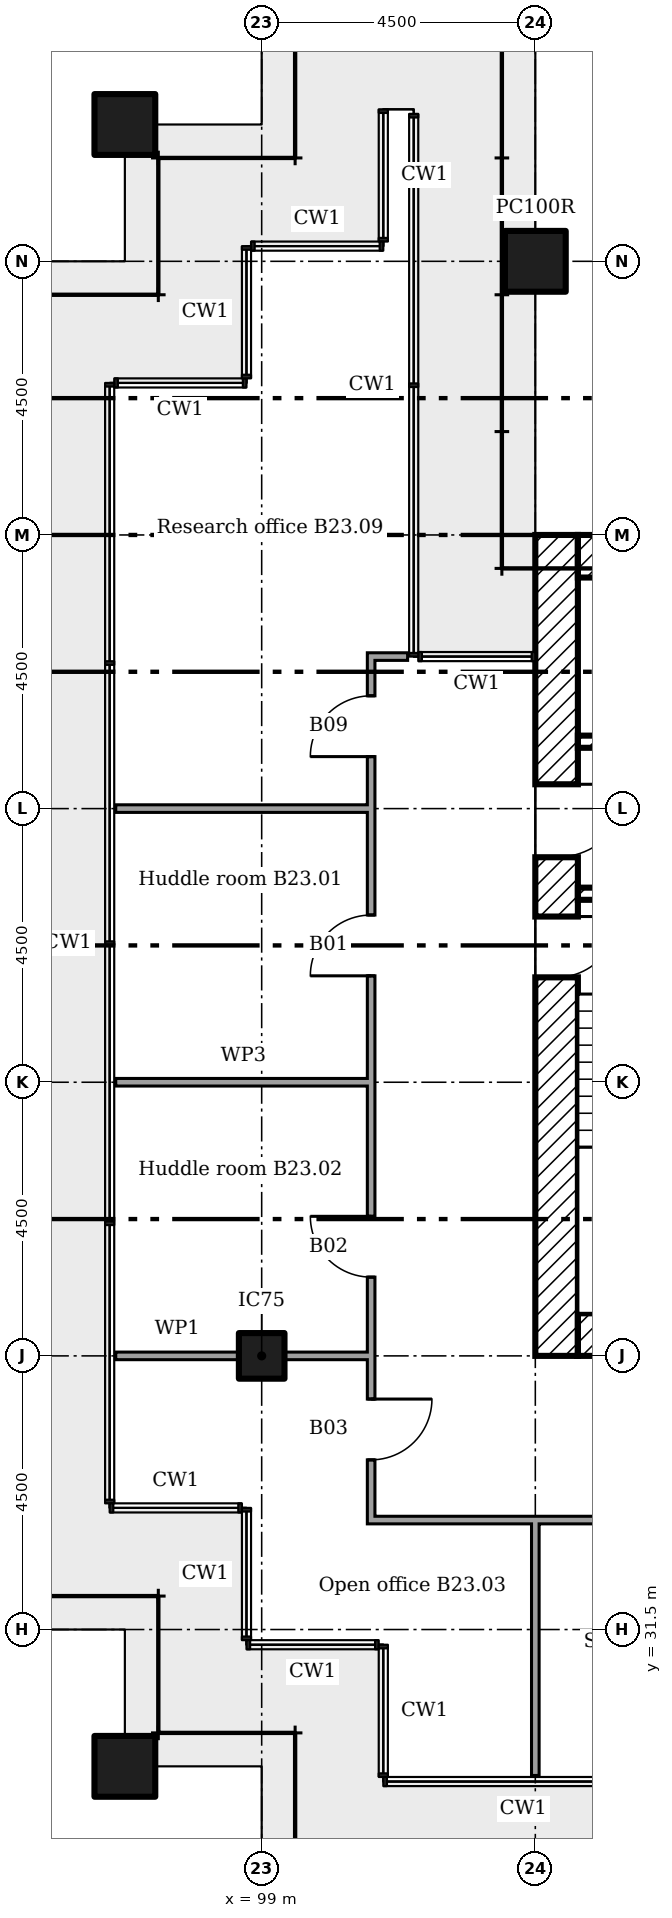
"""IFC4 building model, lengths in metres.
Left out: names, types, materials, properties, quantities, classifications, styles, units other than length and angle.
Written with IfcOpenShell. Run it as: python <this file> out.ifc"""

import sys

from ifc_helpers import new_model, si_unit, direction, frame, frame_2d, origin, origin_2d, place, context, subcontext, project, spatial, rectangle, extrude, element, fill, save


model = new_model("IFC4")
c1 = context("Model", 3, precision=1e-05, world=origin(), true_north=direction((0.0, 1.0)))
c2 = subcontext(c1, "Body", "Model", "MODEL_VIEW")
j1 = project(units=[si_unit("LENGTHUNIT", "METRE"), si_unit("PLANEANGLEUNIT", "RADIAN")], contexts=[c1])
p1 = place(None, origin())
s1 = spatial("IfcSite", under=j1, at=p1, CompositionType="ELEMENT")
p2 = place(p1, origin())
s2 = spatial("IfcBuilding", under=s1, at=p2, CompositionType="ELEMENT")
p3 = place(p2, frame((0.0, 0.0, 95.6)))
s3 = spatial("IfcBuildingStorey", under=s2, at=p3, CompositionType="ELEMENT", Elevation=95.6)
for number, where in (
    (1, (103.5, 54.0, 0.0)),
    (2, (96.75, 56.25, 0.0)),
    (3, (96.75, 29.25, 0.0)),
):
    element("IfcColumn", number, at=place(p3, frame(where)), inside=s3, PredefinedType="COLUMN", context=c2, shape_type="SweptSolid", body=[
        extrude(rectangle(XDim=1.0, YDim=1.0, at=origin_2d()), origin(), (0.0, 0.0, 1.0), 3.6),
    ])
p4 = place(p3, frame((99.0, 36.0, 0.0)))
e4 = element("IfcColumn", 4, at=p4, inside=s3, PredefinedType="COLUMN", context=c2, shape_type="SweptSolid", body=[
    extrude(rectangle(XDim=0.75, YDim=0.75, at=origin_2d()), origin(), (0.0, 0.0, 1.0), 3.6),
])
for number, where in (
    (5, (104.2, 49.15, 0.0)),
    (6, (104.2, 36.35, 0.0)),
):
    element("IfcWall", number, at=place(p3, frame(where)), inside=s3, PredefinedType="SHEAR", context=c2, shape_type="SweptSolid", body=[
        extrude(rectangle(XDim=12.1, YDim=0.7, at=frame_2d((6.05, 0.0))), origin(), (0.0, 0.0, 1.0), 3.35),
    ])
p5 = place(p3, frame((103.85, 36.0, 0.0), z_axis=(0.0, 0.0, 1.0), x_axis=(0.0, 1.0, 0.0)))
e7 = element("IfcWall", 7, at=p5, inside=s3, PredefinedType="SHEAR", context=c2, shape_type="SweptSolid", body=[
    extrude(rectangle(XDim=13.5, YDim=0.7, at=frame_2d((6.75, 0.0))), origin(), (0.0, 0.0, 1.0), 3.35),
])
p6 = place(p5, frame((8.2, 0.0, 0.0)))
e8 = element("IfcOpeningElement", 8, at=p6, cuts=e7, PredefinedType="OPENING", context=c2, shape_type="SweptSolid", body=[
    extrude(rectangle(XDim=1.2, YDim=2.1, at=frame_2d((0.6, 1.05))), frame((0.0, 0.36, 0.0), z_axis=(0.0, -1.0, 0.0), x_axis=(1.0, 0.0, 0.0)), (0.0, 0.0, 1.0), 0.72),
])
p7 = place(p5, frame((6.225, 0.0, 0.0)))
e9 = element("IfcOpeningElement", 9, at=p7, cuts=e7, PredefinedType="OPENING", context=c2, shape_type="SweptSolid", body=[
    extrude(rectangle(XDim=1.0, YDim=2.1, at=frame_2d((0.5, 1.05))), frame((0.0, 0.36, 0.0), z_axis=(0.0, -1.0, 0.0), x_axis=(1.0, 0.0, 0.0)), (0.0, 0.0, 1.0), 0.72),
])
p8 = place(p3, frame((104.2, 46.1, 0.0)))
e10 = element("IfcWall", 10, at=p8, inside=s3, PredefinedType="SHEAR", context=c2, shape_type="SweptSolid", body=[
    extrude(rectangle(XDim=3.133, YDim=0.2, at=frame_2d((1.567, 0.0))), origin(), (0.0, 0.0, 1.0), 3.35),
])
p9 = place(p8, frame((1.317, 0.0, 0.0)))
e11 = element("IfcOpeningElement", 11, at=p9, cuts=e10, PredefinedType="OPENING", context=c2, shape_type="SweptSolid", body=[
    extrude(rectangle(XDim=0.9, YDim=2.1, at=frame_2d((0.45, 1.05))), frame((0.0, 0.11, 0.0), z_axis=(0.0, -1.0, 0.0), x_axis=(1.0, 0.0, 0.0)), (0.0, 0.0, 1.0), 0.22),
])
p10 = place(p3, frame((104.2, 43.6, 0.0)))
e12 = element("IfcWall", 12, at=p10, inside=s3, PredefinedType="SHEAR", context=c2, shape_type="SweptSolid", body=[
    extrude(rectangle(XDim=2.8, YDim=0.2, at=frame_2d((1.4, 0.0))), origin(), (0.0, 0.0, 1.0), 3.35),
])
p11 = place(p10, frame((1.05, 0.0, 0.0)))
e13 = element("IfcOpeningElement", 13, at=p11, cuts=e12, PredefinedType="OPENING", context=c2, shape_type="SweptSolid", body=[
    extrude(rectangle(XDim=1.0, YDim=2.1, at=frame_2d((0.5, 1.05))), frame((0.0, 0.11, 0.0), z_axis=(0.0, -1.0, 0.0), x_axis=(1.0, 0.0, 0.0)), (0.0, 0.0, 1.0), 0.22),
])
p12 = place(p3, frame((100.738, 33.3, 0.0)))
e14 = element("IfcWall", 14, at=p12, inside=s3, PredefinedType="PARTITIONING", context=c2, shape_type="SweptSolid", body=[
    extrude(rectangle(XDim=19.025, YDim=0.125, at=frame_2d((9.512, 0.0))), origin(), (0.0, 0.0, 1.0), 3.45),
])
p13 = place(p12, frame((6.762, 0.0, 0.0)))
e15 = element("IfcOpeningElement", 15, at=p13, cuts=e14, PredefinedType="OPENING", context=c2, shape_type="SweptSolid", body=[
    extrude(rectangle(XDim=1.0, YDim=2.1, at=frame_2d((0.5, 1.05))), frame((0.0, 0.073, 0.0), z_axis=(0.0, -1.0, 0.0), x_axis=(1.0, 0.0, 0.0)), (0.0, 0.0, 1.0), 0.145),
])
p14 = place(p12, frame((13.058, 0.0, 0.0)))
e16 = element("IfcOpeningElement", 16, at=p14, cuts=e14, PredefinedType="OPENING", context=c2, shape_type="SweptSolid", body=[
    extrude(rectangle(XDim=1.0, YDim=2.1, at=frame_2d((0.5, 1.05))), frame((0.0, 0.073, 0.0), z_axis=(0.0, -1.0, 0.0), x_axis=(1.0, 0.0, 0.0)), (0.0, 0.0, 1.0), 0.145),
])
p15 = place(p3, frame((96.6, 36.0, 0.0)))
e17 = element("IfcWall", 17, at=p15, inside=s3, PredefinedType="PARTITIONING", context=c2, shape_type="SweptSolid", body=[
    extrude(rectangle(XDim=2.025, YDim=0.125, at=frame_2d((1.012, 0.0))), origin(), (0.0, 0.0, 1.0), 2.842),
])
p16 = place(p3, frame((99.375, 36.0, 0.0)))
e18 = element("IfcWall", 18, at=p16, inside=s3, PredefinedType="PARTITIONING", context=c2, shape_type="SweptSolid", body=[
    extrude(rectangle(XDim=1.425, YDim=0.125, at=frame_2d((0.712, 0.0))), origin(), (0.0, 0.0, 1.0), 2.842),
])
p17 = place(p3, frame((96.6, 40.5, 0.0)))
e19 = element("IfcWall", 19, at=p17, inside=s3, PredefinedType="MOVABLE", context=c2, shape_type="SweptSolid", body=[
    extrude(rectangle(XDim=4.2, YDim=0.125, at=frame_2d((2.1, 0.0))), origin(), (0.0, 0.0, 1.0), 2.851),
])
p18 = place(p3, frame((96.6, 45.0, 0.0)))
e20 = element("IfcWall", 20, at=p18, inside=s3, PredefinedType="PARTITIONING", context=c2, shape_type="SweptSolid", body=[
    extrude(rectangle(XDim=4.2, YDim=0.125, at=frame_2d((2.1, 0.0))), origin(), (0.0, 0.0, 1.0), 2.851),
])
p19 = place(p3, frame((100.738, 47.5, 0.0)))
e21 = element("IfcWall", 21, at=p19, inside=s3, PredefinedType="PARTITIONING", context=c2, shape_type="SweptSolid", body=[
    extrude(rectangle(XDim=0.662, YDim=0.125, at=frame_2d((0.331, 0.0))), origin(), (0.0, 0.0, 1.0), 3.45),
])
p20 = place(p3, frame((100.8, 33.363, 0.0), z_axis=(0.0, 0.0, 1.0), x_axis=(0.0, 1.0, 0.0)))
e22 = element("IfcWall", 22, at=p20, inside=s3, PredefinedType="PARTITIONING", context=c2, shape_type="SweptSolid", body=[
    extrude(rectangle(XDim=14.075, YDim=0.125, at=frame_2d((7.038, 0.0))), origin(), (0.0, 0.0, 1.0), 3.45),
])
p21 = place(p20, frame((8.887, 0.0, 0.0)))
e23 = element("IfcOpeningElement", 23, at=p21, cuts=e22, PredefinedType="OPENING", context=c2, shape_type="SweptSolid", body=[
    extrude(rectangle(XDim=1.0, YDim=2.1, at=frame_2d((0.5, 1.05))), frame((0.0, 0.073, 0.0), z_axis=(0.0, -1.0, 0.0), x_axis=(1.0, 0.0, 0.0)), (0.0, 0.0, 1.0), 0.145),
])
p22 = place(p20, frame((3.933, 0.0, 0.0)))
e24 = element("IfcOpeningElement", 24, at=p22, cuts=e22, PredefinedType="OPENING", context=c2, shape_type="SweptSolid", body=[
    extrude(rectangle(XDim=1.0, YDim=2.1, at=frame_2d((0.5, 1.05))), frame((0.0, 0.073, 0.0), z_axis=(0.0, -1.0, 0.0), x_axis=(1.0, 0.0, 0.0)), (0.0, 0.0, 1.0), 0.145),
])
p23 = place(p20, frame((0.927, 0.0, 0.0)))
e25 = element("IfcOpeningElement", 25, at=p23, cuts=e22, PredefinedType="OPENING", context=c2, shape_type="SweptSolid", body=[
    extrude(rectangle(XDim=1.0, YDim=2.1, at=frame_2d((0.5, 1.05))), frame((0.0, 0.073, 0.0), z_axis=(0.0, -1.0, 0.0), x_axis=(1.0, 0.0, 0.0)), (0.0, 0.0, 1.0), 0.145),
])
p24 = place(p20, frame((12.492, 0.0, 0.0)))
e26 = element("IfcOpeningElement", 26, at=p24, cuts=e22, PredefinedType="OPENING", context=c2, shape_type="SweptSolid", body=[
    extrude(rectangle(XDim=1.0, YDim=2.1, at=frame_2d((0.5, 1.05))), frame((0.0, 0.073, 0.0), z_axis=(0.0, -1.0, 0.0), x_axis=(1.0, 0.0, 0.0)), (0.0, 0.0, 1.0), 0.145),
])
p25 = place(p3, frame((103.5, 29.1, 0.0), z_axis=(0.0, 0.0, 1.0), x_axis=(0.0, 1.0, 0.0)))
e27 = element("IfcWall", 27, at=p25, inside=s3, PredefinedType="PARTITIONING", context=c2, shape_type="SweptSolid", body=[
    extrude(rectangle(XDim=4.2, YDim=0.125, at=frame_2d((2.1, 0.0))), origin(), (0.0, 0.0, 1.0), 2.851),
])
p26 = place(p6, frame((1.2, 0.0, 0.0), x_axis=(-1.0, 0.0, 0.0)))
e28 = element("IfcDoor", 28, at=p26, inside=s3, OperationType="SINGLE_SWING_RIGHT", PredefinedType="DOOR", context=c2, shape_type="SweptSolid", body=[
    extrude(rectangle(XDim=1.2, YDim=2.1, at=frame_2d((0.6, 1.05))), frame((0.0, 0.025, 0.0), z_axis=(0.0, -1.0, 0.0), x_axis=(1.0, 0.0, 0.0)), (0.0, 0.0, 1.0), 0.05),
])
fill(e8, e28)
p27 = place(p7, frame((1.0, 0.0, 0.0), x_axis=(-1.0, 0.0, 0.0)))
e29 = element("IfcDoor", 29, at=p27, inside=s3, OperationType="SINGLE_SWING_RIGHT", PredefinedType="DOOR", context=c2, shape_type="SweptSolid", body=[
    extrude(rectangle(XDim=1.0, YDim=2.1, at=frame_2d((0.5, 1.05))), frame((0.0, 0.025, 0.0), z_axis=(0.0, -1.0, 0.0), x_axis=(1.0, 0.0, 0.0)), (0.0, 0.0, 1.0), 0.05),
])
fill(e9, e29)
p28 = place(p21, origin())
e30 = element("IfcDoor", 30, at=p28, inside=s3, OperationType="SINGLE_SWING_RIGHT", PredefinedType="DOOR", context=c2, shape_type="SweptSolid", body=[
    extrude(rectangle(XDim=1.0, YDim=2.1, at=frame_2d((0.5, 1.05))), frame((0.0, 0.025, 0.0), z_axis=(0.0, -1.0, 0.0), x_axis=(1.0, 0.0, 0.0)), (0.0, 0.0, 1.0), 0.05),
])
fill(e23, e30)
p29 = place(p22, origin())
e31 = element("IfcDoor", 31, at=p29, inside=s3, OperationType="SINGLE_SWING_LEFT", PredefinedType="DOOR", context=c2, shape_type="SweptSolid", body=[
    extrude(rectangle(XDim=1.0, YDim=2.1, at=frame_2d((0.5, 1.05))), frame((0.0, 0.025, 0.0), z_axis=(0.0, -1.0, 0.0), x_axis=(1.0, 0.0, 0.0)), (0.0, 0.0, 1.0), 0.05),
])
fill(e24, e31)
p30 = place(p23, frame((1.0, 0.0, 0.0), x_axis=(-1.0, 0.0, 0.0)))
e32 = element("IfcDoor", 32, at=p30, inside=s3, OperationType="SINGLE_SWING_RIGHT", PredefinedType="DOOR", context=c2, shape_type="SweptSolid", body=[
    extrude(rectangle(XDim=1.0, YDim=2.1, at=frame_2d((0.5, 1.05))), frame((0.0, 0.025, 0.0), z_axis=(0.0, -1.0, 0.0), x_axis=(1.0, 0.0, 0.0)), (0.0, 0.0, 1.0), 0.05),
])
fill(e25, e32)
p31 = place(p24, origin())
e33 = element("IfcDoor", 33, at=p31, inside=s3, OperationType="SINGLE_SWING_RIGHT", PredefinedType="DOOR", context=c2, shape_type="SweptSolid", body=[
    extrude(rectangle(XDim=1.0, YDim=2.1, at=frame_2d((0.5, 1.05))), frame((0.0, 0.025, 0.0), z_axis=(0.0, -1.0, 0.0), x_axis=(1.0, 0.0, 0.0)), (0.0, 0.0, 1.0), 0.05),
])
fill(e26, e33)
save(model, sys.argv[1])
